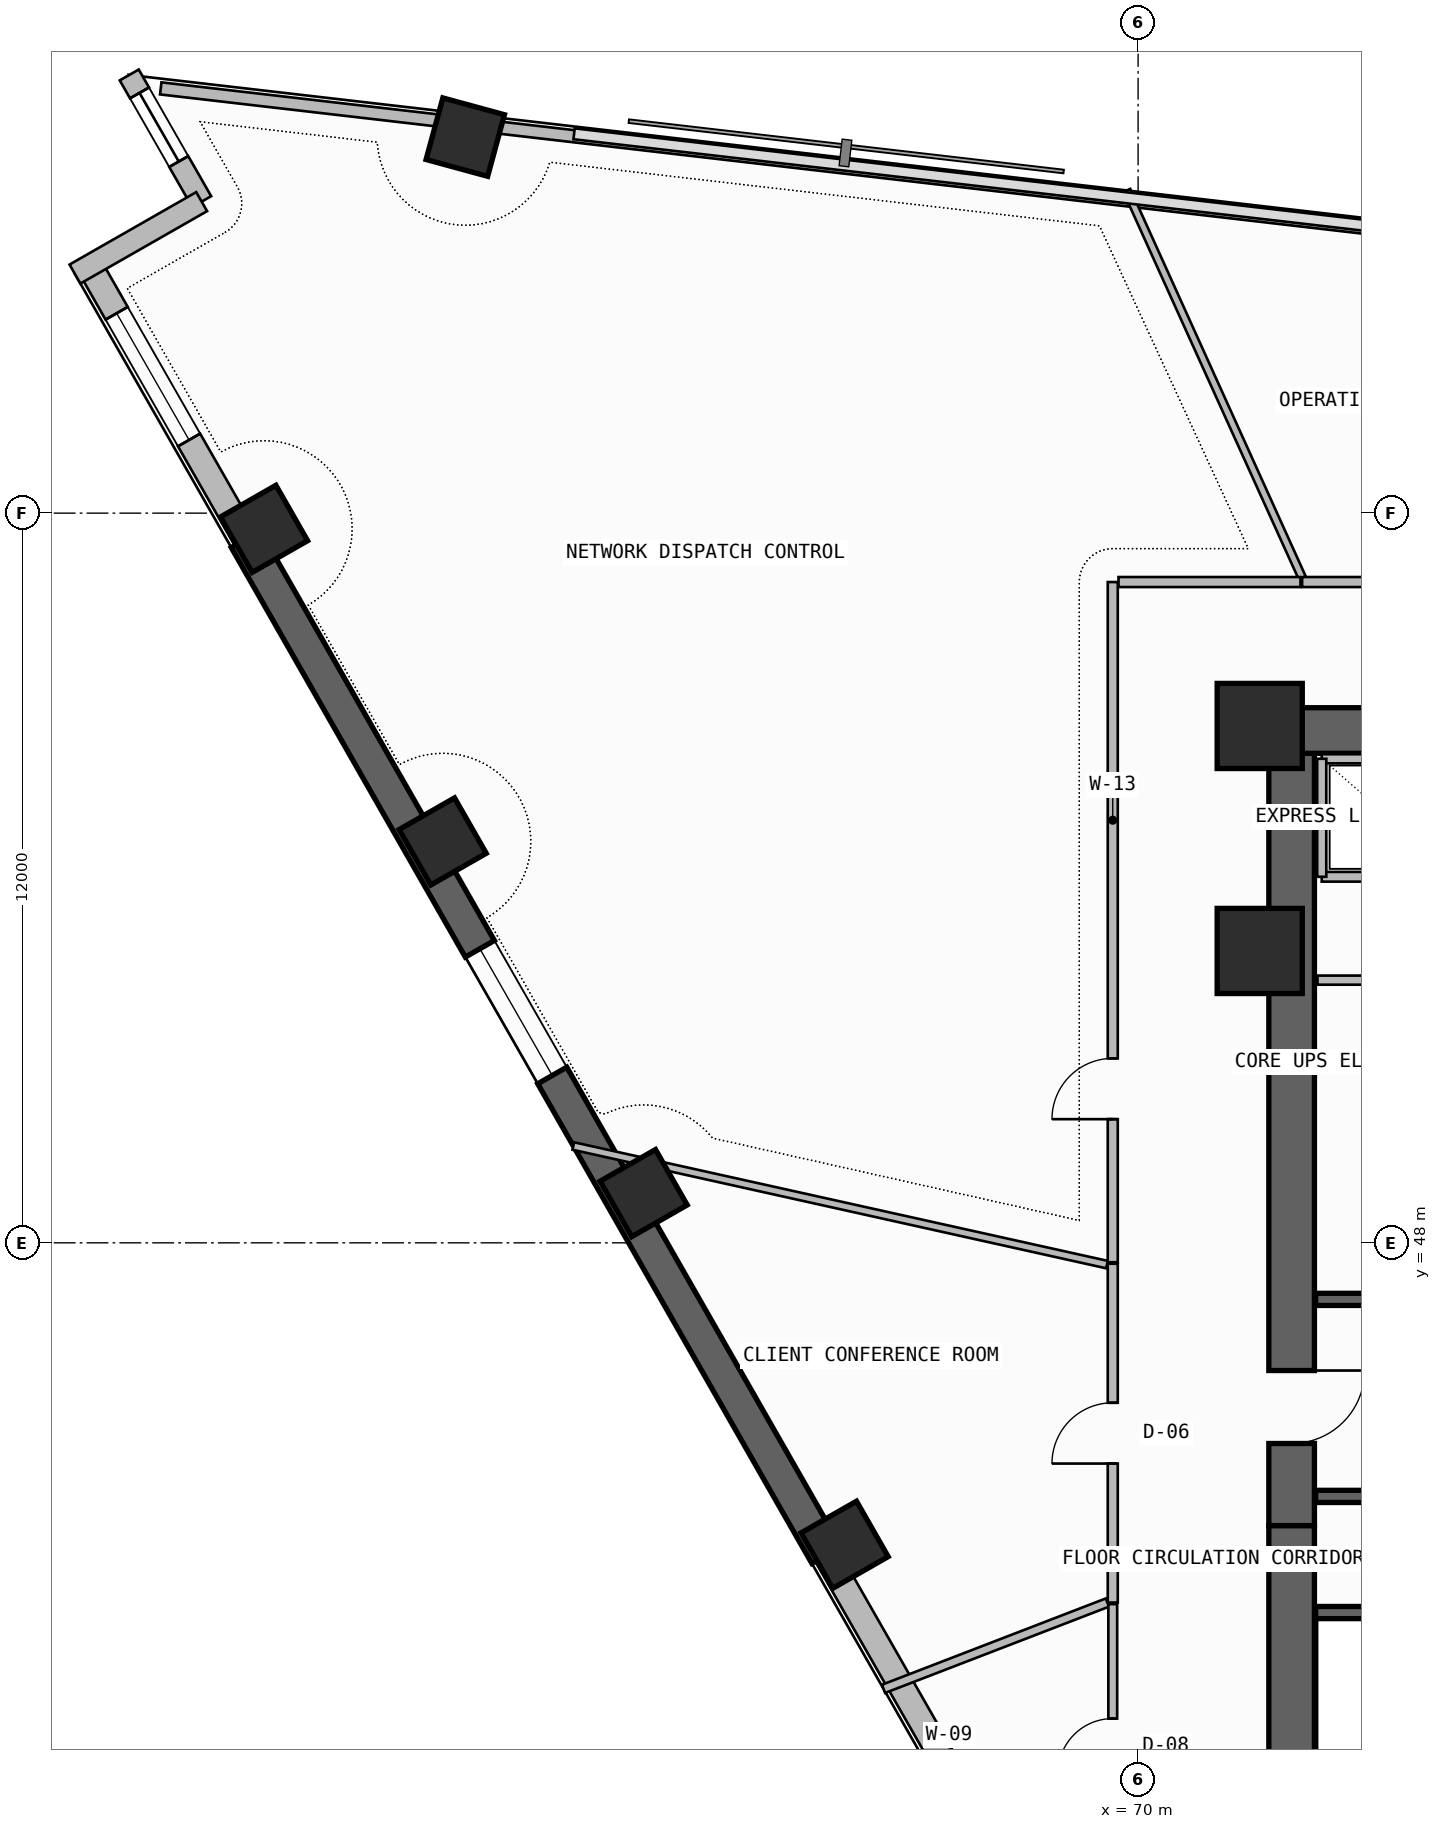
"""IFC4 building model, lengths in metres.
Left out: names, types, materials, properties, quantities, classifications, styles, units other than length and angle.
Written with IfcOpenShell. Run it as: python <this file> out.ifc"""

import sys

from ifc_helpers import new_model, si_unit, direction, frame, frame_2d, origin, origin_2d, place, context, subcontext, project, spatial, rectangle, extrude, element, fill, save


model = new_model("IFC4")
c1 = context("Model", 3, precision=1e-05, world=origin(), true_north=direction((0.0, 1.0)))
c2 = subcontext(c1, "Body", "Model", "MODEL_VIEW")
j1 = project(units=[si_unit("LENGTHUNIT", "METRE"), si_unit("PLANEANGLEUNIT", "RADIAN")], contexts=[c1])
p1 = place(None, origin())
s1 = spatial("IfcSite", under=j1, at=p1, CompositionType="ELEMENT")
p2 = place(p1, origin())
s2 = spatial("IfcBuilding", under=s1, at=p2, CompositionType="ELEMENT")
p3 = place(p2, frame((0.0, 0.0, 225.54)))
s3 = spatial("IfcBuildingStorey", under=s2, at=p3, CompositionType="ELEMENT", Elevation=225.54)
p4 = place(p3, frame((72.525, 35.5, -0.26), z_axis=(0.0, 0.0, 1.0), x_axis=(0.0, 1.0, 0.0)))
e1 = element("IfcWall", 1, at=p4, inside=s3, PredefinedType="SHEAR", context=c2, shape_type="SweptSolid", body=[
    extrude(rectangle(XDim=7.85, YDim=0.75, at=frame_2d((3.925, 0.0))), origin(), (0.0, 0.0, 1.0), 3.52),
])
p5 = place(p4, frame((1.45, 0.0, 0.26)))
e2 = element("IfcOpeningElement", 2, at=p5, cuts=e1, PredefinedType="OPENING", context=c2, shape_type="SweptSolid", body=[
    extrude(rectangle(XDim=1.2, YDim=2.2, at=frame_2d((0.6, 1.1))), frame((0.0, 0.385, 0.0), z_axis=(0.0, -1.0, 0.0), x_axis=(1.0, 0.0, 0.0)), (0.0, 0.0, 1.0), 0.77),
])
p6 = place(p3, frame((72.525, 43.35, -0.26), z_axis=(0.0, 0.0, 1.0), x_axis=(0.0, 1.0, 0.0)))
e3 = element("IfcWall", 3, at=p6, inside=s3, PredefinedType="SHEAR", context=c2, shape_type="SweptSolid", body=[
    extrude(rectangle(XDim=12.7, YDim=0.75, at=frame_2d((6.35, 0.0))), origin(), (0.0, 0.0, 1.0), 3.52),
])
p7 = place(p6, frame((1.35, 0.0, 0.26)))
e4 = element("IfcOpeningElement", 4, at=p7, cuts=e3, PredefinedType="OPENING", context=c2, shape_type="SweptSolid", body=[
    extrude(rectangle(XDim=1.2, YDim=2.2, at=frame_2d((0.6, 1.1))), frame((0.0, 0.385, 0.0), z_axis=(0.0, -1.0, 0.0), x_axis=(1.0, 0.0, 0.0)), (0.0, 0.0, 1.0), 0.77),
])
p8 = place(p3, frame((72.0, 56.425, -0.26), z_axis=(0.0, 0.0, 1.0), x_axis=(1.0, 0.0, 0.0)))
e5 = element("IfcWall", 5, at=p8, inside=s3, PredefinedType="SHEAR", context=c2, shape_type="SweptSolid", body=[
    extrude(rectangle(XDim=13.75, YDim=0.75, at=frame_2d((6.875, 0.0))), origin(), (0.0, 0.0, 1.0), 3.52),
])
for number, where, z_axis, x_axis in (
    (6, (72.0, 52.8, 0.0), (0.0, 0.0, 1.0), (1.0, 0.0, 0.0)),
    (7, (72.0, 56.5, 0.0), (0.0, 0.0, 1.0), (1.0, 0.0, 0.0)),
):
    element("IfcColumn", number, at=place(p3, frame(where, z_axis=z_axis, x_axis=x_axis)), inside=s3, PredefinedType="COLUMN", context=c2, shape_type="SweptSolid", body=[
        extrude(rectangle(XDim=1.4, YDim=1.4, at=origin_2d()), origin(), (0.0, 0.0, 1.0), 3.52),
    ])
for number, where, z_axis, x_axis in (
    (8, (58.934, 66.184, 0.0), (0.0, 0.0, 1.0), (0.263, 0.965, 0.0)),
    (9, (55.625, 59.742, 0.0), (0.0, 0.0, 1.0), (-0.496, 0.868, 0.0)),
    (10, (58.563, 54.601, 0.0), (0.0, 0.0, 1.0), (-0.496, 0.868, 0.0)),
    (11, (61.868, 48.818, 0.0), (0.0, 0.0, 1.0), (-0.496, 0.868, 0.0)),
    (12, (65.173, 43.035, 0.0), (0.0, 0.0, 1.0), (-0.496, 0.868, 0.0)),
):
    element("IfcColumn", number, at=place(p3, frame(where, z_axis=z_axis, x_axis=x_axis)), inside=s3, PredefinedType="COLUMN", context=c2, shape_type="SweptSolid", body=[
        extrude(rectangle(XDim=1.05, YDim=1.05, at=origin_2d()), origin(), (0.0, 0.0, 1.0), 3.52),
    ])
p9 = place(p3, frame((52.754, 64.068, 0.0), z_axis=(0.0, 0.0, 1.0), x_axis=(0.496209984367, -0.868202540548, 0.0)))
e13 = element("IfcWall", 13, at=p9, inside=s3, PredefinedType="SOLIDWALL", context=c2, shape_type="SweptSolid", body=[
    extrude(rectangle(XDim=5.181, YDim=0.42, at=frame_2d((2.59, 0.0))), origin(), (0.0, 0.0, 1.0), 2.645),
])
p10 = place(p9, frame((0.9, 0.0, 1.1)))
e14 = element("IfcOpeningElement", 14, at=p10, cuts=e13, PredefinedType="OPENING", context=c2, shape_type="SweptSolid", body=[
    extrude(rectangle(XDim=2.4, YDim=1.2, at=frame_2d((1.2, 0.6))), frame((0.0, 0.22, 0.0), z_axis=(0.0, -1.0, 0.0), x_axis=(1.0, 0.0, 0.0)), (0.0, 0.0, 1.0), 0.44),
])
p11 = place(p3, frame((55.325, 59.57, -0.26), z_axis=(0.0, 0.0, 1.0), x_axis=(0.496211351597, -0.868201759124, 0.0)))
e15 = element("IfcWall", 15, at=p11, inside=s3, PredefinedType="SHEAR", context=c2, shape_type="SweptSolid", body=[
    extrude(rectangle(XDim=19.243, YDim=0.55, at=frame_2d((9.622, 0.0))), origin(), (0.0, 0.0, 1.0), 3.52),
])
p12 = place(p11, frame((7.757, 0.0, 1.1)))
e16 = element("IfcOpeningElement", 16, at=p12, cuts=e15, PredefinedType="OPENING", context=c2, shape_type="SweptSolid", body=[
    extrude(rectangle(XDim=2.4, YDim=1.2, at=frame_2d((1.2, 0.6))), frame((0.0, 0.285, 0.0), z_axis=(0.0, -1.0, 0.0), x_axis=(1.0, 0.0, 0.0)), (0.0, 0.0, 1.0), 0.57),
])
p13 = place(p3, frame((64.874, 42.864, 0.0), z_axis=(0.0, 0.0, 1.0), x_axis=(0.49622043329, -0.868196568517, 0.0)))
e17 = element("IfcWall", 17, at=p13, inside=s3, PredefinedType="SOLIDWALL", context=c2, shape_type="SweptSolid", body=[
    extrude(rectangle(XDim=12.582, YDim=0.42, at=frame_2d((6.291, 0.0))), origin(), (0.0, 0.0, 1.0), 2.645),
])
p14 = place(p13, frame((8.136, 0.0, 1.1)))
e18 = element("IfcOpeningElement", 18, at=p14, cuts=e17, PredefinedType="OPENING", context=c2, shape_type="SweptSolid", body=[
    extrude(rectangle(XDim=2.4, YDim=1.2, at=frame_2d((1.2, 0.6))), frame((0.0, 0.22, 0.0), z_axis=(0.0, -1.0, 0.0), x_axis=(1.0, 0.0, 0.0)), (0.0, 0.0, 1.0), 0.44),
])
p15 = place(p3, frame((53.408, 67.206, 0.0), z_axis=(0.0, 0.0, 1.0), x_axis=(0.496292324652, -0.868155474838, 0.0)))
e19 = element("IfcWall", 19, at=p15, inside=s3, PredefinedType="SOLIDWALL", context=c2, shape_type="SweptSolid", body=[
    extrude(rectangle(XDim=2.4, YDim=0.36, at=frame_2d((1.2, 0.0))), origin(), (0.0, 0.0, 1.0), 3.26),
])
p16 = place(p15, frame((0.34, 0.0, 0.45)))
e20 = element("IfcOpeningElement", 20, at=p16, cuts=e19, PredefinedType="OPENING", context=c2, shape_type="SweptSolid", body=[
    extrude(rectangle(XDim=1.3, YDim=2.4, at=frame_2d((0.65, 1.2))), frame((0.0, 0.19, 0.0), z_axis=(0.0, -1.0, 0.0), x_axis=(1.0, 0.0, 0.0)), (0.0, 0.0, 1.0), 0.38),
])
p17 = place(p3, frame((54.599, 65.123, 0.0), z_axis=(0.0, 0.0, 1.0), x_axis=(-0.86818053093, -0.4962484919, 0.0)))
e21 = element("IfcWall", 21, at=p17, inside=s3, PredefinedType="SOLIDWALL", context=c2, shape_type="SweptSolid", body=[
    extrude(rectangle(XDim=2.4, YDim=0.36, at=frame_2d((1.2, 0.0))), origin(), (0.0, 0.0, 1.0), 3.26),
])
p18 = place(p3, frame((85.424, 63.338, 0.0), z_axis=(0.0, 0.0, 1.0), x_axis=(-0.993364714048, 0.115006716693, 0.0)))
e22 = element("IfcWall", 22, at=p18, inside=s3, PredefinedType="PARAPET", context=c2, shape_type="SweptSolid", body=[
    extrude(rectangle(XDim=26.302, YDim=0.2, at=frame_2d((13.151, 0.0))), origin(), (0.0, 0.0, 1.0), 1.15),
])
p19 = place(p3, frame((58.622, 66.441, 0.0), z_axis=(0.0, 0.0, 1.0), x_axis=(-0.993362937665, 0.115022059074, 0.0)))
e23 = element("IfcWall", 23, at=p19, inside=s3, PredefinedType="PARAPET", context=c2, shape_type="SweptSolid", body=[
    extrude(rectangle(XDim=4.727, YDim=0.2, at=frame_2d((2.364, 0.0))), origin(), (0.0, 0.0, 1.0), 1.15),
])
p20 = place(p3, frame((72.92, 41.92, -0.26), z_axis=(0.0, 0.0, 1.0), x_axis=(1.0, 0.0, 0.0)))
e24 = element("IfcWall", 24, at=p20, inside=s3, PredefinedType="SOLIDWALL", context=c2, shape_type="SweptSolid", body=[
    extrude(rectangle(XDim=7.58, YDim=0.2, at=frame_2d((3.79, 0.0))), origin(), (0.0, 0.0, 1.0), 3.52),
])
for number, where, z_axis, x_axis in (
    (25, (72.92, 43.83, -0.26), (0.0, 0.0, 1.0), (1.0, 0.0, 0.0)),
    (26, (72.92, 47.07, -0.26), (0.0, 0.0, 1.0), (1.0, 0.0, 0.0)),
):
    element("IfcWall", number, at=place(p3, frame(where, z_axis=z_axis, x_axis=x_axis)), inside=s3, PredefinedType="SOLIDWALL", context=c2, shape_type="SweptSolid", body=[
        extrude(rectangle(XDim=7.7, YDim=0.2, at=frame_2d((3.85, 0.0))), origin(), (0.0, 0.0, 1.0), 3.52),
    ])
p21 = place(p3, frame((72.95, 52.32, 0.0), z_axis=(0.0, 0.0, 1.0), x_axis=(1.0, 0.0, 0.0)))
e27 = element("IfcWall", 27, at=p21, inside=s3, PredefinedType="SOLIDWALL", context=c2, shape_type="SweptSolid", body=[
    extrude(rectangle(XDim=3.33, YDim=0.15, at=frame_2d((1.665, 0.0))), origin(), (0.0, 0.0, 1.0), 3.26),
])
p22 = place(p3, frame((73.02, 54.02, 0.0), z_axis=(0.0, 0.0, 1.0), x_axis=(1.0, 0.0, 0.0)))
e28 = element("IfcWall", 28, at=p22, inside=s3, PredefinedType="SOLIDWALL", context=c2, shape_type="SweptSolid", body=[
    extrude(rectangle(XDim=12.08, YDim=0.16, at=frame_2d((6.04, 0.0))), origin(), (0.0, 0.0, 1.0), 3.26),
])
p23 = place(p22, frame((4.03, 0.0, 0.0)))
e29 = element("IfcOpeningElement", 29, at=p23, cuts=e28, PredefinedType="OPENING", context=c2, shape_type="SweptSolid", body=[
    extrude(rectangle(XDim=1.1, YDim=2.25, at=frame_2d((0.55, 1.125))), frame((0.0, 0.09, 0.0), z_axis=(0.0, -1.0, 0.0), x_axis=(1.0, 0.0, 0.0)), (0.0, 0.0, 1.0), 0.18),
])
p24 = place(p22, frame((6.28, 0.0, 0.0)))
e30 = element("IfcOpeningElement", 30, at=p24, cuts=e28, PredefinedType="OPENING", context=c2, shape_type="SweptSolid", body=[
    extrude(rectangle(XDim=1.1, YDim=2.25, at=frame_2d((0.55, 1.125))), frame((0.0, 0.09, 0.0), z_axis=(0.0, -1.0, 0.0), x_axis=(1.0, 0.0, 0.0)), (0.0, 0.0, 1.0), 0.18),
])
p25 = place(p22, frame((8.53, 0.0, 0.0)))
e31 = element("IfcOpeningElement", 31, at=p25, cuts=e28, PredefinedType="OPENING", context=c2, shape_type="SweptSolid", body=[
    extrude(rectangle(XDim=1.1, YDim=2.25, at=frame_2d((0.55, 1.125))), frame((0.0, 0.09, 0.0), z_axis=(0.0, -1.0, 0.0), x_axis=(1.0, 0.0, 0.0)), (0.0, 0.0, 1.0), 0.18),
])
p26 = place(p3, frame((73.02, 55.96, 0.0), z_axis=(0.0, 0.0, 1.0), x_axis=(1.0, 0.0, 0.0)))
e32 = element("IfcWall", 32, at=p26, inside=s3, PredefinedType="SOLIDWALL", context=c2, shape_type="SweptSolid", body=[
    extrude(rectangle(XDim=3.5, YDim=0.15, at=frame_2d((1.75, 0.0))), origin(), (0.0, 0.0, 1.0), 3.26),
])
p27 = place(p3, frame((73.02, 54.02, 0.0), z_axis=(0.0, 0.0, 1.0), x_axis=(0.0, 1.0, 0.0)))
e33 = element("IfcWall", 33, at=p27, inside=s3, PredefinedType="PLUMBINGWALL", context=c2, shape_type="SweptSolid", body=[
    extrude(rectangle(XDim=1.94, YDim=0.15, at=frame_2d((0.97, 0.0))), origin(), (0.0, 0.0, 1.0), 3.26),
])
p28 = place(p3, frame((69.583, 47.656, 0.0), z_axis=(0.0, 0.0, 1.0), x_axis=(0.0, -1.0, 0.0)))
e34 = element("IfcWall", 34, at=p28, inside=s3, PredefinedType="PARTITIONING", context=c2, shape_type="SweptSolid", body=[
    extrude(rectangle(XDim=5.572, YDim=0.165, at=frame_2d((2.786, 0.0))), origin(), (0.0, 0.0, 1.0), 3.26),
])
p29 = place(p28, frame((2.286, 0.0, 0.0)))
e35 = element("IfcOpeningElement", 35, at=p29, cuts=e34, PredefinedType="OPENING", context=c2, shape_type="SweptSolid", body=[
    extrude(rectangle(XDim=1.0, YDim=2.2, at=frame_2d((0.5, 1.1))), frame((0.0, 0.093, 0.0), z_axis=(0.0, -1.0, 0.0), x_axis=(1.0, 0.0, 0.0)), (0.0, 0.0, 1.0), 0.185),
])
p30 = place(p3, frame((69.494, 42.084, 0.0), z_axis=(0.0, 0.0, 1.0), x_axis=(-0.933093355894, -0.359634243623, 0.0)))
e36 = element("IfcWall", 36, at=p30, inside=s3, PredefinedType="PARTITIONING", context=c2, shape_type="SweptSolid", body=[
    extrude(rectangle(XDim=3.945, YDim=0.145, at=frame_2d((1.972, 0.0))), origin(), (0.0, 0.0, 1.0), 3.26),
])
p31 = place(p3, frame((60.711, 49.592, 0.0), z_axis=(0.0, 0.0, 1.0), x_axis=(0.976196003544, -0.216890208781, 0.0)))
e37 = element("IfcWall", 37, at=p31, inside=s3, PredefinedType="PARTITIONING", context=c2, shape_type="SweptSolid", body=[
    extrude(rectangle(XDim=8.992, YDim=0.125, at=frame_2d((4.496, 0.0))), origin(), (0.0, 0.0, 1.0), 2.645),
])
p32 = place(p3, frame((69.583, 42.058, 0.0), z_axis=(0.0, 0.0, 1.0), x_axis=(0.0, -1.0, 0.0)))
e38 = element("IfcWall", 38, at=p32, inside=s3, PredefinedType="PARTITIONING", context=c2, shape_type="SweptSolid", body=[
    extrude(rectangle(XDim=4.663, YDim=0.145, at=frame_2d((2.332, 0.0))), origin(), (0.0, 0.0, 1.0), 3.26),
])
p33 = place(p32, frame((1.882, 0.0, 0.0)))
e39 = element("IfcOpeningElement", 39, at=p33, cuts=e38, PredefinedType="OPENING", context=c2, shape_type="SweptSolid", body=[
    extrude(rectangle(XDim=0.9, YDim=2.1, at=frame_2d((0.45, 1.05))), frame((0.0, 0.083, 0.0), z_axis=(0.0, -1.0, 0.0), x_axis=(1.0, 0.0, 0.0)), (0.0, 0.0, 1.0), 0.165),
])
p34 = place(p3, frame((77.256, 58.867, 0.0), z_axis=(0.0, 0.0, 1.0), x_axis=(-1.0, 0.0, 0.0)))
e40 = element("IfcWall", 40, at=p34, inside=s3, PredefinedType="PARTITIONING", context=c2, shape_type="SweptSolid", body=[
    extrude(rectangle(XDim=4.559, YDim=0.165, at=frame_2d((2.279, 0.0))), origin(), (0.0, 0.0, 1.0), 3.26),
])
p35 = place(p3, frame((72.697, 58.941, 0.0), z_axis=(0.0, 0.0, 1.0), x_axis=(-0.412591789652, 0.910916030769, 0.0)))
e41 = element("IfcWall", 41, at=p35, inside=s3, PredefinedType="PARTITIONING", context=c2, shape_type="SweptSolid", body=[
    extrude(rectangle(XDim=6.988, YDim=0.125, at=frame_2d((3.494, 0.0))), origin(), (0.0, 0.0, 1.0), 3.26),
])
p36 = place(p3, frame((69.583, 58.867, 0.0), z_axis=(0.0, 0.0, 1.0), x_axis=(0.0, -1.0, 0.0)))
e42 = element("IfcWall", 42, at=p36, inside=s3, PredefinedType="PARTITIONING", context=c2, shape_type="SweptSolid", body=[
    extrude(rectangle(XDim=11.186, YDim=0.165, at=frame_2d((5.593, 0.0))), origin(), (0.0, 0.0, 1.0), 2.745),
])
p37 = place(p36, frame((7.833, 0.0, 0.0)))
e43 = element("IfcOpeningElement", 43, at=p37, cuts=e42, PredefinedType="OPENING", context=c2, shape_type="SweptSolid", body=[
    extrude(rectangle(XDim=1.0, YDim=2.2, at=frame_2d((0.5, 1.1))), frame((0.0, 0.093, 0.0), z_axis=(0.0, -1.0, 0.0), x_axis=(1.0, 0.0, 0.0)), (0.0, 0.0, 1.0), 0.185),
])
p38 = place(p3, frame((72.671, 58.867, 0.0), z_axis=(0.0, 0.0, 1.0), x_axis=(-1.0, 0.0, 0.0)))
e44 = element("IfcWall", 44, at=p38, inside=s3, PredefinedType="PARTITIONING", context=c2, shape_type="SweptSolid", body=[
    extrude(rectangle(XDim=2.993, YDim=0.165, at=frame_2d((1.497, 0.0))), origin(), (0.0, 0.0, 1.0), 3.26),
])
p39 = place(p10, origin())
e45 = element("IfcWindow", 45, at=p39, inside=s3, PartitioningType="SINGLE_PANEL", PredefinedType="WINDOW", context=c2, shape_type="SweptSolid", body=[
    extrude(rectangle(XDim=2.4, YDim=1.2, at=frame_2d((1.2, 0.6))), frame((0.0, 0.03, 0.0), z_axis=(0.0, -1.0, 0.0), x_axis=(1.0, 0.0, 0.0)), (0.0, 0.0, 1.0), 0.06),
])
fill(e14, e45)
p40 = place(p12, origin())
e46 = element("IfcWindow", 46, at=p40, inside=s3, PartitioningType="SINGLE_PANEL", PredefinedType="WINDOW", context=c2, shape_type="SweptSolid", body=[
    extrude(rectangle(XDim=2.4, YDim=1.2, at=frame_2d((1.2, 0.6))), frame((0.0, 0.03, 0.0), z_axis=(0.0, -1.0, 0.0), x_axis=(1.0, 0.0, 0.0)), (0.0, 0.0, 1.0), 0.06),
])
fill(e16, e46)
p41 = place(p16, origin())
e47 = element("IfcWindow", 47, at=p41, inside=s3, PartitioningType="SINGLE_PANEL", PredefinedType="WINDOW", context=c2, shape_type="SweptSolid", body=[
    extrude(rectangle(XDim=1.3, YDim=2.4, at=frame_2d((0.65, 1.2))), frame((0.0, 0.03, 0.0), z_axis=(0.0, -1.0, 0.0), x_axis=(1.0, 0.0, 0.0)), (0.0, 0.0, 1.0), 0.06),
])
fill(e20, e47)
p42 = place(p7, frame((1.2, 0.0, 0.0), z_axis=(0.0, 0.0, 1.0), x_axis=(-1.0, 0.0, 0.0)))
e48 = element("IfcDoor", 48, at=p42, inside=s3, OperationType="SINGLE_SWING_LEFT", PredefinedType="USERDEFINED", context=c2, shape_type="SweptSolid", body=[
    extrude(rectangle(XDim=1.2, YDim=2.2, at=frame_2d((0.6, 1.1))), frame((0.0, 0.025, 0.0), z_axis=(0.0, -1.0, 0.0), x_axis=(1.0, 0.0, 0.0)), (0.0, 0.0, 1.0), 0.05),
])
fill(e4, e48)
p43 = place(p29, frame((1.0, 0.0, 0.0), z_axis=(0.0, 0.0, 1.0), x_axis=(-1.0, 0.0, 0.0)))
e49 = element("IfcDoor", 49, at=p43, inside=s3, OperationType="SINGLE_SWING_LEFT", PredefinedType="DOOR", context=c2, shape_type="SweptSolid", body=[
    extrude(rectangle(XDim=1.0, YDim=2.2, at=frame_2d((0.5, 1.1))), frame((0.0, 0.025, 0.0), z_axis=(0.0, -1.0, 0.0), x_axis=(1.0, 0.0, 0.0)), (0.0, 0.0, 1.0), 0.05),
])
fill(e35, e49)
p44 = place(p33, frame((0.9, 0.0, 0.0), z_axis=(0.0, 0.0, 1.0), x_axis=(-1.0, 0.0, 0.0)))
e50 = element("IfcDoor", 50, at=p44, inside=s3, OperationType="SINGLE_SWING_LEFT", PredefinedType="DOOR", context=c2, shape_type="SweptSolid", body=[
    extrude(rectangle(XDim=0.9, YDim=2.1, at=frame_2d((0.45, 1.05))), frame((0.0, 0.025, 0.0), z_axis=(0.0, -1.0, 0.0), x_axis=(1.0, 0.0, 0.0)), (0.0, 0.0, 1.0), 0.05),
])
fill(e39, e50)
p45 = place(p37, frame((1.0, 0.0, 0.0), z_axis=(0.0, 0.0, 1.0), x_axis=(-1.0, 0.0, 0.0)))
e51 = element("IfcDoor", 51, at=p45, inside=s3, OperationType="SINGLE_SWING_LEFT", PredefinedType="DOOR", context=c2, shape_type="SweptSolid", body=[
    extrude(rectangle(XDim=1.0, YDim=2.2, at=frame_2d((0.5, 1.1))), frame((0.0, 0.025, 0.0), z_axis=(0.0, -1.0, 0.0), x_axis=(1.0, 0.0, 0.0)), (0.0, 0.0, 1.0), 0.05),
])
fill(e43, e51)
save(model, sys.argv[1])
